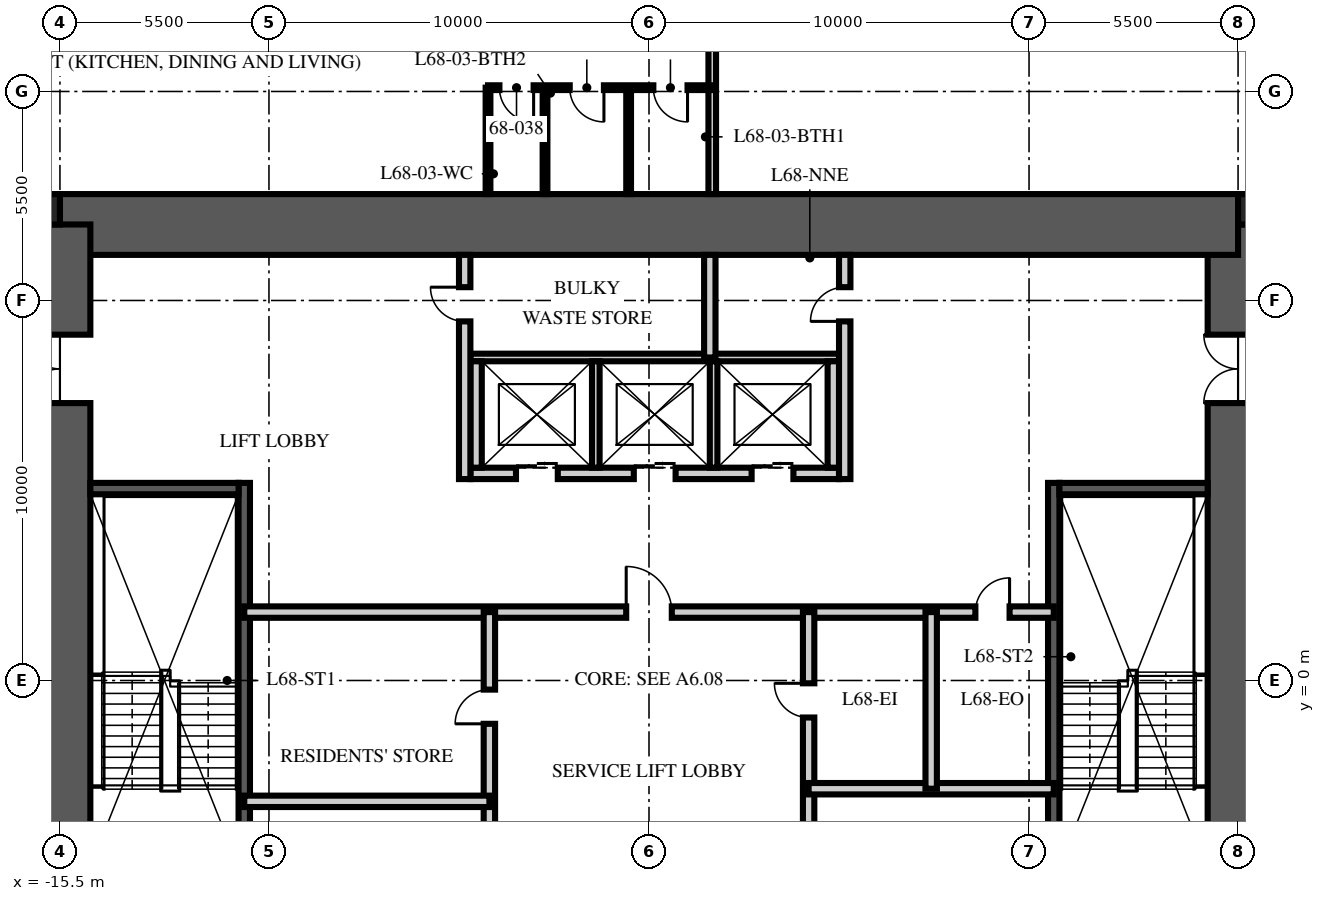
"""IFC4 building model, lengths in metres.
Left out: names, types, materials, properties, quantities, classifications, styles, units other than length and angle.
Written with IfcOpenShell. Run it as: python <this file> out.ifc"""

import sys

from ifc_helpers import new_model, si_unit, direction, frame, frame_2d, origin, origin_2d, place, context, subcontext, project, spatial, rectangle, extrude, element, fill, save


model = new_model("IFC4")
c1 = context("Model", 3, precision=1e-05, world=origin(), true_north=direction((0.0, 1.0)))
c2 = subcontext(c1, "Body", "Model", "MODEL_VIEW")
j1 = project(units=[si_unit("LENGTHUNIT", "METRE"), si_unit("PLANEANGLEUNIT", "RADIAN")], contexts=[c1])
p1 = place(None, origin())
s1 = spatial("IfcSite", under=j1, at=p1, CompositionType="ELEMENT")
p2 = place(p1, origin())
s2 = spatial("IfcBuilding", under=s1, at=p2, CompositionType="ELEMENT")
p3 = place(p2, frame((0.0, 0.0, 270.75)))
s3 = spatial("IfcBuildingStorey", under=s2, at=p3, CompositionType="ELEMENT", Elevation=270.75)
p4 = place(p3, frame((15.5, -12.0, -0.25), z_axis=(0.0, 0.0, 1.0), x_axis=(0.0, 1.0, 0.0)))
e1 = element("IfcWall", 1, at=p4, inside=s3, PredefinedType="SHEAR", context=c2, shape_type="SweptSolid", body=[
    extrude(rectangle(XDim=24.0, YDim=1.6, at=frame_2d((12.0, 0.0))), origin(), (0.0, 0.0, 1.0), 3.75),
])
p5 = place(p4, frame((3.2, 0.0, 0.25)))
e2 = element("IfcOpeningElement", 2, at=p5, cuts=e1, PredefinedType="OPENING", context=c2, shape_type="SweptSolid", body=[
    extrude(rectangle(XDim=1.2, YDim=2.1, at=frame_2d((0.6, 1.05))), frame((0.0, 0.81, 0.0), z_axis=(0.0, -1.0, 0.0), x_axis=(1.0, 0.0, 0.0)), (0.0, 0.0, 1.0), 1.62),
])
p6 = place(p4, frame((19.3, 0.0, 0.25)))
e3 = element("IfcOpeningElement", 3, at=p6, cuts=e1, PredefinedType="OPENING", context=c2, shape_type="SweptSolid", body=[
    extrude(rectangle(XDim=1.8, YDim=2.1, at=frame_2d((0.9, 1.05))), frame((0.0, 0.81, 0.0), z_axis=(0.0, -1.0, 0.0), x_axis=(1.0, 0.0, 0.0)), (0.0, 0.0, 1.0), 1.62),
])
p7 = place(p3, frame((-15.5, 12.0, -0.25), z_axis=(0.0, 0.0, 1.0), x_axis=(1.0, 0.0, 0.0)))
e4 = element("IfcWall", 4, at=p7, inside=s3, PredefinedType="SHEAR", context=c2, shape_type="SweptSolid", body=[
    extrude(rectangle(XDim=31.0, YDim=1.6, at=frame_2d((15.5, 0.0))), origin(), (0.0, 0.0, 1.0), 3.75),
])
p8 = place(p3, frame((-15.5, -12.0, -0.25), z_axis=(0.0, 0.0, 1.0), x_axis=(0.0, 1.0, 0.0)))
e5 = element("IfcWall", 5, at=p8, inside=s3, PredefinedType="SHEAR", context=c2, shape_type="SweptSolid", body=[
    extrude(rectangle(XDim=24.0, YDim=1.6, at=frame_2d((12.0, 0.0))), origin(), (0.0, 0.0, 1.0), 3.75),
])
p9 = place(p8, frame((3.2, 0.0, 0.25)))
e6 = element("IfcOpeningElement", 6, at=p9, cuts=e5, PredefinedType="OPENING", context=c2, shape_type="SweptSolid", body=[
    extrude(rectangle(XDim=1.2, YDim=2.1, at=frame_2d((0.6, 1.05))), frame((0.0, 0.81, 0.0), z_axis=(0.0, -1.0, 0.0), x_axis=(1.0, 0.0, 0.0)), (0.0, 0.0, 1.0), 1.62),
])
p10 = place(p8, frame((19.3, 0.0, 0.25)))
e7 = element("IfcOpeningElement", 7, at=p10, cuts=e5, PredefinedType="OPENING", context=c2, shape_type="SweptSolid", body=[
    extrude(rectangle(XDim=1.8, YDim=2.1, at=frame_2d((0.9, 1.05))), frame((0.0, 0.81, 0.0), z_axis=(0.0, -1.0, 0.0), x_axis=(1.0, 0.0, 0.0)), (0.0, 0.0, 1.0), 1.62),
])
for number, where, z_axis, x_axis in (
    (8, (15.9, 12.4, -0.25), (0.0, 0.0, 1.0), (1.0, 0.0, 0.0)),
    (9, (-15.9, 12.4, -0.25), (0.0, 0.0, 1.0), (1.0, 0.0, 0.0)),
):
    element("IfcColumn", number, at=place(p3, frame(where, z_axis=z_axis, x_axis=x_axis)), inside=s3, PredefinedType="COLUMN", context=c2, shape_type="SweptSolid", body=[
        extrude(rectangle(XDim=0.8, YDim=0.8, at=origin_2d()), origin(), (0.0, 0.0, 1.0), 3.75),
    ])
p11 = place(p3, frame((-10.65, -4.9, 0.0), z_axis=(0.0, 0.0, 1.0), x_axis=(0.0, 1.0, 0.0)))
e10 = element("IfcWall", 10, at=p11, inside=s3, PredefinedType="SOLIDWALL", context=c2, shape_type="SweptSolid", body=[
    extrude(rectangle(XDim=10.1, YDim=0.3, at=frame_2d((5.05, 0.0))), origin(), (0.0, 0.0, 1.0), 3.5),
])
p12 = place(p3, frame((-14.7, 5.05, 0.0), z_axis=(0.0, 0.0, 1.0), x_axis=(1.0, 0.0, 0.0)))
e11 = element("IfcWall", 11, at=p12, inside=s3, PredefinedType="SOLIDWALL", context=c2, shape_type="SweptSolid", body=[
    extrude(rectangle(XDim=3.9, YDim=0.3, at=frame_2d((1.95, 0.0))), origin(), (0.0, 0.0, 1.0), 3.5),
])
p13 = place(p3, frame((10.65, -4.9, 0.0), z_axis=(0.0, 0.0, 1.0), x_axis=(0.0, 1.0, 0.0)))
e12 = element("IfcWall", 12, at=p13, inside=s3, PredefinedType="SOLIDWALL", context=c2, shape_type="SweptSolid", body=[
    extrude(rectangle(XDim=10.1, YDim=0.3, at=frame_2d((5.05, 0.0))), origin(), (0.0, 0.0, 1.0), 3.5),
])
p14 = place(p3, frame((14.7, 5.05, 0.0), z_axis=(0.0, 0.0, 1.0), x_axis=(-1.0, 0.0, 0.0)))
e13 = element("IfcWall", 13, at=p14, inside=s3, PredefinedType="SOLIDWALL", context=c2, shape_type="SweptSolid", body=[
    extrude(rectangle(XDim=3.9, YDim=0.3, at=frame_2d((1.95, 0.0))), origin(), (0.0, 0.0, 1.0), 3.5),
])
p15 = place(p3, frame((-4.7, 5.45, 0.0), z_axis=(0.0, 0.0, 1.0), x_axis=(1.0, 0.0, 0.0)))
e14 = element("IfcWall", 14, at=p15, inside=s3, PredefinedType="PARTITIONING", context=c2, shape_type="SweptSolid", body=[
    extrude(rectangle(XDim=9.7, YDim=0.3, at=frame_2d((4.85, 0.0))), origin(), (0.0, 0.0, 1.0), 3.5),
])
p16 = place(p15, frame((1.2, 0.0, 0.0)))
e15 = element("IfcOpeningElement", 15, at=p16, cuts=e14, PredefinedType="OPENING", context=c2, shape_type="SweptSolid", body=[
    extrude(rectangle(XDim=1.1, YDim=2.1, at=frame_2d((0.55, 1.05))), frame((0.0, 0.16, 0.0), z_axis=(0.0, -1.0, 0.0), x_axis=(1.0, 0.0, 0.0)), (0.0, 0.0, 1.0), 0.32),
])
p17 = place(p15, frame((4.3, 0.0, 0.0)))
e16 = element("IfcOpeningElement", 16, at=p17, cuts=e14, PredefinedType="OPENING", context=c2, shape_type="SweptSolid", body=[
    extrude(rectangle(XDim=1.1, YDim=2.1, at=frame_2d((0.55, 1.05))), frame((0.0, 0.16, 0.0), z_axis=(0.0, -1.0, 0.0), x_axis=(1.0, 0.0, 0.0)), (0.0, 0.0, 1.0), 0.32),
])
p18 = place(p15, frame((7.4, 0.0, 0.0)))
e17 = element("IfcOpeningElement", 17, at=p18, cuts=e14, PredefinedType="OPENING", context=c2, shape_type="SweptSolid", body=[
    extrude(rectangle(XDim=1.1, YDim=2.1, at=frame_2d((0.55, 1.05))), frame((0.0, 0.16, 0.0), z_axis=(0.0, -1.0, 0.0), x_axis=(1.0, 0.0, 0.0)), (0.0, 0.0, 1.0), 0.32),
])
p19 = place(p3, frame((-4.7, 8.5, 0.0), z_axis=(0.0, 0.0, 1.0), x_axis=(1.0, 0.0, 0.0)))
e18 = element("IfcWall", 18, at=p19, inside=s3, PredefinedType="PARTITIONING", context=c2, shape_type="SweptSolid", body=[
    extrude(rectangle(XDim=9.7, YDim=0.2, at=frame_2d((4.85, 0.0))), origin(), (0.0, 0.0, 1.0), 3.5),
])
for number, where, z_axis, x_axis in (
    (19, (-4.55, 5.6, 0.0), (0.0, 0.0, 1.0), (0.0, 1.0, 0.0)),
    (20, (4.85, 5.6, 0.0), (0.0, 0.0, 1.0), (0.0, 1.0, 0.0)),
):
    element("IfcWall", number, at=place(p3, frame(where, z_axis=z_axis, x_axis=x_axis)), inside=s3, PredefinedType="PARTITIONING", context=c2, shape_type="SweptSolid", body=[
        extrude(rectangle(XDim=2.8, YDim=0.3, at=frame_2d((1.4, 0.0))), origin(), (0.0, 0.0, 1.0), 3.5),
    ])
for number, where, z_axis, x_axis in (
    (21, (-1.4, 5.6, 0.0), (0.0, 0.0, 1.0), (0.0, 1.0, 0.0)),
    (22, (1.7, 5.6, 0.0), (0.0, 0.0, 1.0), (0.0, 1.0, 0.0)),
):
    element("IfcWall", number, at=place(p3, frame(where, z_axis=z_axis, x_axis=x_axis)), inside=s3, PredefinedType="PARTITIONING", context=c2, shape_type="SweptSolid", body=[
        extrude(rectangle(XDim=2.8, YDim=0.2, at=frame_2d((1.4, 0.0))), origin(), (0.0, 0.0, 1.0), 3.5),
    ])
p20 = place(p3, frame((-10.65, 1.8, 0.0), z_axis=(0.0, 0.0, 1.0), x_axis=(1.0, 0.0, 0.0)))
e23 = element("IfcWall", 23, at=p20, inside=s3, PredefinedType="PARTITIONING", context=c2, shape_type="SweptSolid", body=[
    extrude(rectangle(XDim=21.3, YDim=0.3, at=frame_2d((10.65, 0.0))), origin(), (0.0, 0.0, 1.0), 3.5),
])
p21 = place(p20, frame((10.05, 0.0, 0.0)))
e24 = element("IfcOpeningElement", 24, at=p21, cuts=e23, PredefinedType="OPENING", context=c2, shape_type="SweptSolid", body=[
    extrude(rectangle(XDim=1.2, YDim=2.1, at=frame_2d((0.6, 1.05))), frame((0.0, 0.16, 0.0), z_axis=(0.0, -1.0, 0.0), x_axis=(1.0, 0.0, 0.0)), (0.0, 0.0, 1.0), 0.32),
])
p22 = place(p20, frame((19.238, 0.0, 0.0)))
e25 = element("IfcOpeningElement", 25, at=p22, cuts=e23, PredefinedType="OPENING", context=c2, shape_type="SweptSolid", body=[
    extrude(rectangle(XDim=0.9, YDim=2.1, at=frame_2d((0.45, 1.05))), frame((0.0, 0.16, 0.0), z_axis=(0.0, -1.0, 0.0), x_axis=(1.0, 0.0, 0.0)), (0.0, 0.0, 1.0), 0.32),
])
p23 = place(p3, frame((-4.2, -6.65, 0.0), z_axis=(0.0, 0.0, 1.0), x_axis=(0.0, 1.0, 0.0)))
e26 = element("IfcWall", 26, at=p23, inside=s3, PredefinedType="PARTITIONING", context=c2, shape_type="SweptSolid", body=[
    extrude(rectangle(XDim=8.45, YDim=0.3, at=frame_2d((4.225, 0.0))), origin(), (0.0, 0.0, 1.0), 3.5),
])
p24 = place(p23, frame((1.285, 0.0, 0.0)))
e27 = element("IfcOpeningElement", 27, at=p24, cuts=e26, PredefinedType="OPENING", context=c2, shape_type="SweptSolid", body=[
    extrude(rectangle(XDim=0.9, YDim=2.1, at=frame_2d((0.45, 1.05))), frame((0.0, 0.16, 0.0), z_axis=(0.0, -1.0, 0.0), x_axis=(1.0, 0.0, 0.0)), (0.0, 0.0, 1.0), 0.32),
])
p25 = place(p23, frame((5.51, 0.0, 0.0)))
e28 = element("IfcOpeningElement", 28, at=p25, cuts=e26, PredefinedType="OPENING", context=c2, shape_type="SweptSolid", body=[
    extrude(rectangle(XDim=0.9, YDim=2.1, at=frame_2d((0.45, 1.05))), frame((0.0, 0.16, 0.0), z_axis=(0.0, -1.0, 0.0), x_axis=(1.0, 0.0, 0.0)), (0.0, 0.0, 1.0), 0.32),
])
p26 = place(p3, frame((4.2, -6.65, 0.0), z_axis=(0.0, 0.0, 1.0), x_axis=(0.0, 1.0, 0.0)))
e29 = element("IfcWall", 29, at=p26, inside=s3, PredefinedType="PARTITIONING", context=c2, shape_type="SweptSolid", body=[
    extrude(rectangle(XDim=8.45, YDim=0.3, at=frame_2d((4.225, 0.0))), origin(), (0.0, 0.0, 1.0), 3.5),
])
p27 = place(p26, frame((1.451, 0.0, 0.0)))
e30 = element("IfcOpeningElement", 30, at=p27, cuts=e29, PredefinedType="OPENING", context=c2, shape_type="SweptSolid", body=[
    extrude(rectangle(XDim=0.9, YDim=2.1, at=frame_2d((0.45, 1.05))), frame((0.0, 0.16, 0.0), z_axis=(0.0, -1.0, 0.0), x_axis=(1.0, 0.0, 0.0)), (0.0, 0.0, 1.0), 0.32),
])
p28 = place(p26, frame((5.676, 0.0, 0.0)))
e31 = element("IfcOpeningElement", 31, at=p28, cuts=e29, PredefinedType="OPENING", context=c2, shape_type="SweptSolid", body=[
    extrude(rectangle(XDim=0.9, YDim=2.1, at=frame_2d((0.45, 1.05))), frame((0.0, 0.16, 0.0), z_axis=(0.0, -1.0, 0.0), x_axis=(1.0, 0.0, 0.0)), (0.0, 0.0, 1.0), 0.32),
])
for number, where, z_axis, x_axis in (
    (32, (-10.65, -3.18, 0.0), (0.0, 0.0, 1.0), (1.0, 0.0, 0.0)),
    (33, (10.65, -2.848, 0.0), (0.0, 0.0, 1.0), (-1.0, 0.0, 0.0)),
):
    element("IfcWall", number, at=place(p3, frame(where, z_axis=z_axis, x_axis=x_axis)), inside=s3, PredefinedType="PARTITIONING", context=c2, shape_type="SweptSolid", body=[
        extrude(rectangle(XDim=6.45, YDim=0.3, at=frame_2d((3.225, 0.0))), origin(), (0.0, 0.0, 1.0), 3.5),
    ])
p29 = place(p3, frame((7.425, -2.848, 0.0), z_axis=(0.0, 0.0, 1.0), x_axis=(0.0, 1.0, 0.0)))
e34 = element("IfcWall", 34, at=p29, inside=s3, PredefinedType="PARTITIONING", context=c2, shape_type="SweptSolid", body=[
    extrude(rectangle(XDim=4.648, YDim=0.3, at=frame_2d((2.324, 0.0))), origin(), (0.0, 0.0, 1.0), 3.5),
])
p30 = place(p3, frame((-4.85, 5.3, 0.0), z_axis=(0.0, 0.0, 1.0), x_axis=(0.0, 1.0, 0.0)))
e35 = element("IfcWall", 35, at=p30, inside=s3, PredefinedType="PARTITIONING", context=c2, shape_type="SweptSolid", body=[
    extrude(rectangle(XDim=5.9, YDim=0.3, at=frame_2d((2.95, 0.0))), origin(), (0.0, 0.0, 1.0), 3.5),
])
p31 = place(p30, frame((4.15, 0.0, 0.0)))
e36 = element("IfcOpeningElement", 36, at=p31, cuts=e35, PredefinedType="OPENING", context=c2, shape_type="SweptSolid", body=[
    extrude(rectangle(XDim=0.9, YDim=2.1, at=frame_2d((0.45, 1.05))), frame((0.0, 0.16, 0.0), z_axis=(0.0, -1.0, 0.0), x_axis=(1.0, 0.0, 0.0)), (0.0, 0.0, 1.0), 0.32),
])
p32 = place(p3, frame((5.15, 5.3, 0.0), z_axis=(0.0, 0.0, 1.0), x_axis=(0.0, 1.0, 0.0)))
e37 = element("IfcWall", 37, at=p32, inside=s3, PredefinedType="PARTITIONING", context=c2, shape_type="SweptSolid", body=[
    extrude(rectangle(XDim=5.9, YDim=0.3, at=frame_2d((2.95, 0.0))), origin(), (0.0, 0.0, 1.0), 3.5),
])
p33 = place(p32, frame((4.15, 0.0, 0.0)))
e38 = element("IfcOpeningElement", 38, at=p33, cuts=e37, PredefinedType="OPENING", context=c2, shape_type="SweptSolid", body=[
    extrude(rectangle(XDim=0.9, YDim=2.1, at=frame_2d((0.45, 1.05))), frame((0.0, 0.16, 0.0), z_axis=(0.0, -1.0, 0.0), x_axis=(1.0, 0.0, 0.0)), (0.0, 0.0, 1.0), 0.32),
])
p34 = place(p3, frame((1.6, 8.5, 0.0), z_axis=(0.0, 0.0, 1.0), x_axis=(0.0, 1.0, 0.0)))
e39 = element("IfcWall", 39, at=p34, inside=s3, PredefinedType="PARTITIONING", context=c2, shape_type="SweptSolid", body=[
    extrude(rectangle(XDim=2.7, YDim=0.3, at=frame_2d((1.35, 0.0))), origin(), (0.0, 0.0, 1.0), 3.5),
])
p35 = place(p3, frame((1.664, 12.8, 0.0), z_axis=(0.0, 0.0, 1.0), x_axis=(0.0, 1.0, 0.0)))
e40 = element("IfcWall", 40, at=p35, inside=s3, PredefinedType="PARTITIONING", context=c2, shape_type="SweptSolid", body=[
    extrude(rectangle(XDim=12.65, YDim=0.2, at=frame_2d((6.325, 0.0))), origin(), (0.0, 0.0, 1.0), 2.81),
])
p36 = place(p3, frame((1.664, 15.6, 0.0), z_axis=(0.0, 0.0, 1.0), x_axis=(-1.0, 0.0, 0.0)))
e41 = element("IfcWall", 41, at=p36, inside=s3, PredefinedType="PARTITIONING", context=c2, shape_type="SweptSolid", body=[
    extrude(rectangle(XDim=5.9, YDim=0.125, at=frame_2d((2.95, 0.0))), origin(), (0.0, 0.0, 1.0), 2.6),
])
p37 = place(p36, frame((0.65, 0.0, 0.0)))
e42 = element("IfcOpeningElement", 42, at=p37, cuts=e41, PredefinedType="OPENING", context=c2, shape_type="SweptSolid", body=[
    extrude(rectangle(XDim=0.9, YDim=2.1, at=frame_2d((0.45, 1.05))), frame((0.0, 0.073, 0.0), z_axis=(0.0, -1.0, 0.0), x_axis=(1.0, 0.0, 0.0)), (0.0, 0.0, 1.0), 0.145),
])
p38 = place(p36, frame((2.85, 0.0, 0.0)))
e43 = element("IfcOpeningElement", 43, at=p38, cuts=e41, PredefinedType="OPENING", context=c2, shape_type="SweptSolid", body=[
    extrude(rectangle(XDim=0.9, YDim=2.1, at=frame_2d((0.45, 1.05))), frame((0.0, 0.073, 0.0), z_axis=(0.0, -1.0, 0.0), x_axis=(1.0, 0.0, 0.0)), (0.0, 0.0, 1.0), 0.145),
])
p39 = place(p36, frame((4.7, 0.0, 0.0)))
e44 = element("IfcOpeningElement", 44, at=p39, cuts=e41, PredefinedType="OPENING", context=c2, shape_type="SweptSolid", body=[
    extrude(rectangle(XDim=0.9, YDim=2.1, at=frame_2d((0.45, 1.05))), frame((0.0, 0.073, 0.0), z_axis=(0.0, -1.0, 0.0), x_axis=(1.0, 0.0, 0.0)), (0.0, 0.0, 1.0), 0.145),
])
for number, where, z_axis, x_axis in (
    (45, (-0.536, 12.8, 0.0), (0.0, 0.0, 1.0), (0.0, 1.0, 0.0)),
    (46, (-2.736, 12.8, 0.0), (0.0, 0.0, 1.0), (0.0, 1.0, 0.0)),
):
    element("IfcWall", number, at=place(p3, frame(where, z_axis=z_axis, x_axis=x_axis)), inside=s3, PredefinedType="PARTITIONING", context=c2, shape_type="SweptSolid", body=[
        extrude(rectangle(XDim=2.8, YDim=0.125, at=frame_2d((1.4, 0.0))), origin(), (0.0, 0.0, 1.0), 3.5),
    ])
p40 = place(p3, frame((-4.236, 12.8, 0.0), z_axis=(0.0, 0.0, 1.0), x_axis=(0.0, 1.0, 0.0)))
e47 = element("IfcWall", 47, at=p40, inside=s3, PredefinedType="PARTITIONING", context=c2, shape_type="SweptSolid", body=[
    extrude(rectangle(XDim=2.8, YDim=0.125, at=frame_2d((1.4, 0.0))), origin(), (0.0, 0.0, 1.0), 2.71),
])
p41 = place(p10, origin())
e48 = element("IfcDoor", 48, at=p41, inside=s3, OperationType="DOUBLE_DOOR_SINGLE_SWING", PredefinedType="DOOR", context=c2, shape_type="SweptSolid", body=[
    extrude(rectangle(XDim=1.8, YDim=2.1, at=frame_2d((0.9, 1.05))), frame((0.0, 0.025, 0.0), z_axis=(0.0, -1.0, 0.0), x_axis=(1.0, 0.0, 0.0)), (0.0, 0.0, 1.0), 0.05),
])
fill(e7, e48)
p42 = place(p6, origin())
e49 = element("IfcDoor", 49, at=p42, inside=s3, OperationType="DOUBLE_DOOR_SINGLE_SWING", PredefinedType="DOOR", context=c2, shape_type="SweptSolid", body=[
    extrude(rectangle(XDim=1.8, YDim=2.1, at=frame_2d((0.9, 1.05))), frame((0.0, 0.025, 0.0), z_axis=(0.0, -1.0, 0.0), x_axis=(1.0, 0.0, 0.0)), (0.0, 0.0, 1.0), 0.05),
])
fill(e3, e49)
p43 = place(p16, origin())
e50 = element("IfcDoor", 50, at=p43, inside=s3, OperationType="DOUBLE_DOOR_SLIDING", PredefinedType="DOOR", context=c2, shape_type="SweptSolid", body=[
    extrude(rectangle(XDim=1.1, YDim=2.1, at=frame_2d((0.55, 1.05))), frame((0.0, 0.025, 0.0), z_axis=(0.0, -1.0, 0.0), x_axis=(1.0, 0.0, 0.0)), (0.0, 0.0, 1.0), 0.05),
])
fill(e15, e50)
p44 = place(p17, origin())
e51 = element("IfcDoor", 51, at=p44, inside=s3, OperationType="DOUBLE_DOOR_SLIDING", PredefinedType="DOOR", context=c2, shape_type="SweptSolid", body=[
    extrude(rectangle(XDim=1.1, YDim=2.1, at=frame_2d((0.55, 1.05))), frame((0.0, 0.025, 0.0), z_axis=(0.0, -1.0, 0.0), x_axis=(1.0, 0.0, 0.0)), (0.0, 0.0, 1.0), 0.05),
])
fill(e16, e51)
p45 = place(p18, origin())
e52 = element("IfcDoor", 52, at=p45, inside=s3, OperationType="DOUBLE_DOOR_SLIDING", PredefinedType="DOOR", context=c2, shape_type="SweptSolid", body=[
    extrude(rectangle(XDim=1.1, YDim=2.1, at=frame_2d((0.55, 1.05))), frame((0.0, 0.025, 0.0), z_axis=(0.0, -1.0, 0.0), x_axis=(1.0, 0.0, 0.0)), (0.0, 0.0, 1.0), 0.05),
])
fill(e17, e52)
p46 = place(p21, origin())
e53 = element("IfcDoor", 53, at=p46, inside=s3, OperationType="SINGLE_SWING_LEFT", PredefinedType="DOOR", context=c2, shape_type="SweptSolid", body=[
    extrude(rectangle(XDim=1.2, YDim=2.1, at=frame_2d((0.6, 1.05))), frame((0.0, 0.025, 0.0), z_axis=(0.0, -1.0, 0.0), x_axis=(1.0, 0.0, 0.0)), (0.0, 0.0, 1.0), 0.05),
])
fill(e24, e53)
p47 = place(p25, origin())
e54 = element("IfcDoor", 54, at=p47, inside=s3, OperationType="SINGLE_SWING_LEFT", PredefinedType="DOOR", context=c2, shape_type="SweptSolid", body=[
    extrude(rectangle(XDim=0.9, YDim=2.1, at=frame_2d((0.45, 1.05))), frame((0.0, 0.025, 0.0), z_axis=(0.0, -1.0, 0.0), x_axis=(1.0, 0.0, 0.0)), (0.0, 0.0, 1.0), 0.05),
])
fill(e28, e54)
p48 = place(p28, origin())
e55 = element("IfcDoor", 55, at=p48, inside=s3, OperationType="SINGLE_SWING_RIGHT", PredefinedType="DOOR", context=c2, shape_type="SweptSolid", body=[
    extrude(rectangle(XDim=0.9, YDim=2.1, at=frame_2d((0.45, 1.05))), frame((0.0, 0.025, 0.0), z_axis=(0.0, -1.0, 0.0), x_axis=(1.0, 0.0, 0.0)), (0.0, 0.0, 1.0), 0.05),
])
fill(e31, e55)
p49 = place(p22, origin())
e56 = element("IfcDoor", 56, at=p49, inside=s3, OperationType="SINGLE_SWING_RIGHT", PredefinedType="DOOR", context=c2, shape_type="SweptSolid", body=[
    extrude(rectangle(XDim=0.9, YDim=2.1, at=frame_2d((0.45, 1.05))), frame((0.0, 0.025, 0.0), z_axis=(0.0, -1.0, 0.0), x_axis=(1.0, 0.0, 0.0)), (0.0, 0.0, 1.0), 0.05),
])
fill(e25, e56)
p50 = place(p31, origin())
e57 = element("IfcDoor", 57, at=p50, inside=s3, OperationType="SINGLE_SWING_RIGHT", PredefinedType="DOOR", context=c2, shape_type="SweptSolid", body=[
    extrude(rectangle(XDim=0.9, YDim=2.1, at=frame_2d((0.45, 1.05))), frame((0.0, 0.025, 0.0), z_axis=(0.0, -1.0, 0.0), x_axis=(1.0, 0.0, 0.0)), (0.0, 0.0, 1.0), 0.05),
])
fill(e36, e57)
p51 = place(p33, origin())
e58 = element("IfcDoor", 58, at=p51, inside=s3, OperationType="SINGLE_SWING_LEFT", PredefinedType="DOOR", context=c2, shape_type="SweptSolid", body=[
    extrude(rectangle(XDim=0.9, YDim=2.1, at=frame_2d((0.45, 1.05))), frame((0.0, 0.025, 0.0), z_axis=(0.0, -1.0, 0.0), x_axis=(1.0, 0.0, 0.0)), (0.0, 0.0, 1.0), 0.05),
])
fill(e38, e58)
p52 = place(p37, origin())
e59 = element("IfcDoor", 59, at=p52, inside=s3, OperationType="SINGLE_SWING_LEFT", PredefinedType="DOOR", context=c2, shape_type="SweptSolid", body=[
    extrude(rectangle(XDim=0.9, YDim=2.1, at=frame_2d((0.45, 1.05))), frame((0.0, 0.025, 0.0), z_axis=(0.0, -1.0, 0.0), x_axis=(1.0, 0.0, 0.0)), (0.0, 0.0, 1.0), 0.05),
])
fill(e42, e59)
p53 = place(p38, origin())
e60 = element("IfcDoor", 60, at=p53, inside=s3, OperationType="SINGLE_SWING_LEFT", PredefinedType="DOOR", context=c2, shape_type="SweptSolid", body=[
    extrude(rectangle(XDim=0.9, YDim=2.1, at=frame_2d((0.45, 1.05))), frame((0.0, 0.025, 0.0), z_axis=(0.0, -1.0, 0.0), x_axis=(1.0, 0.0, 0.0)), (0.0, 0.0, 1.0), 0.05),
])
fill(e43, e60)
p54 = place(p39, origin())
e61 = element("IfcDoor", 61, at=p54, inside=s3, OperationType="SINGLE_SWING_LEFT", PredefinedType="DOOR", context=c2, shape_type="SweptSolid", body=[
    extrude(rectangle(XDim=0.9, YDim=2.1, at=frame_2d((0.45, 1.05))), frame((0.0, 0.025, 0.0), z_axis=(0.0, -1.0, 0.0), x_axis=(1.0, 0.0, 0.0)), (0.0, 0.0, 1.0), 0.05),
])
fill(e44, e61)
save(model, sys.argv[1])
